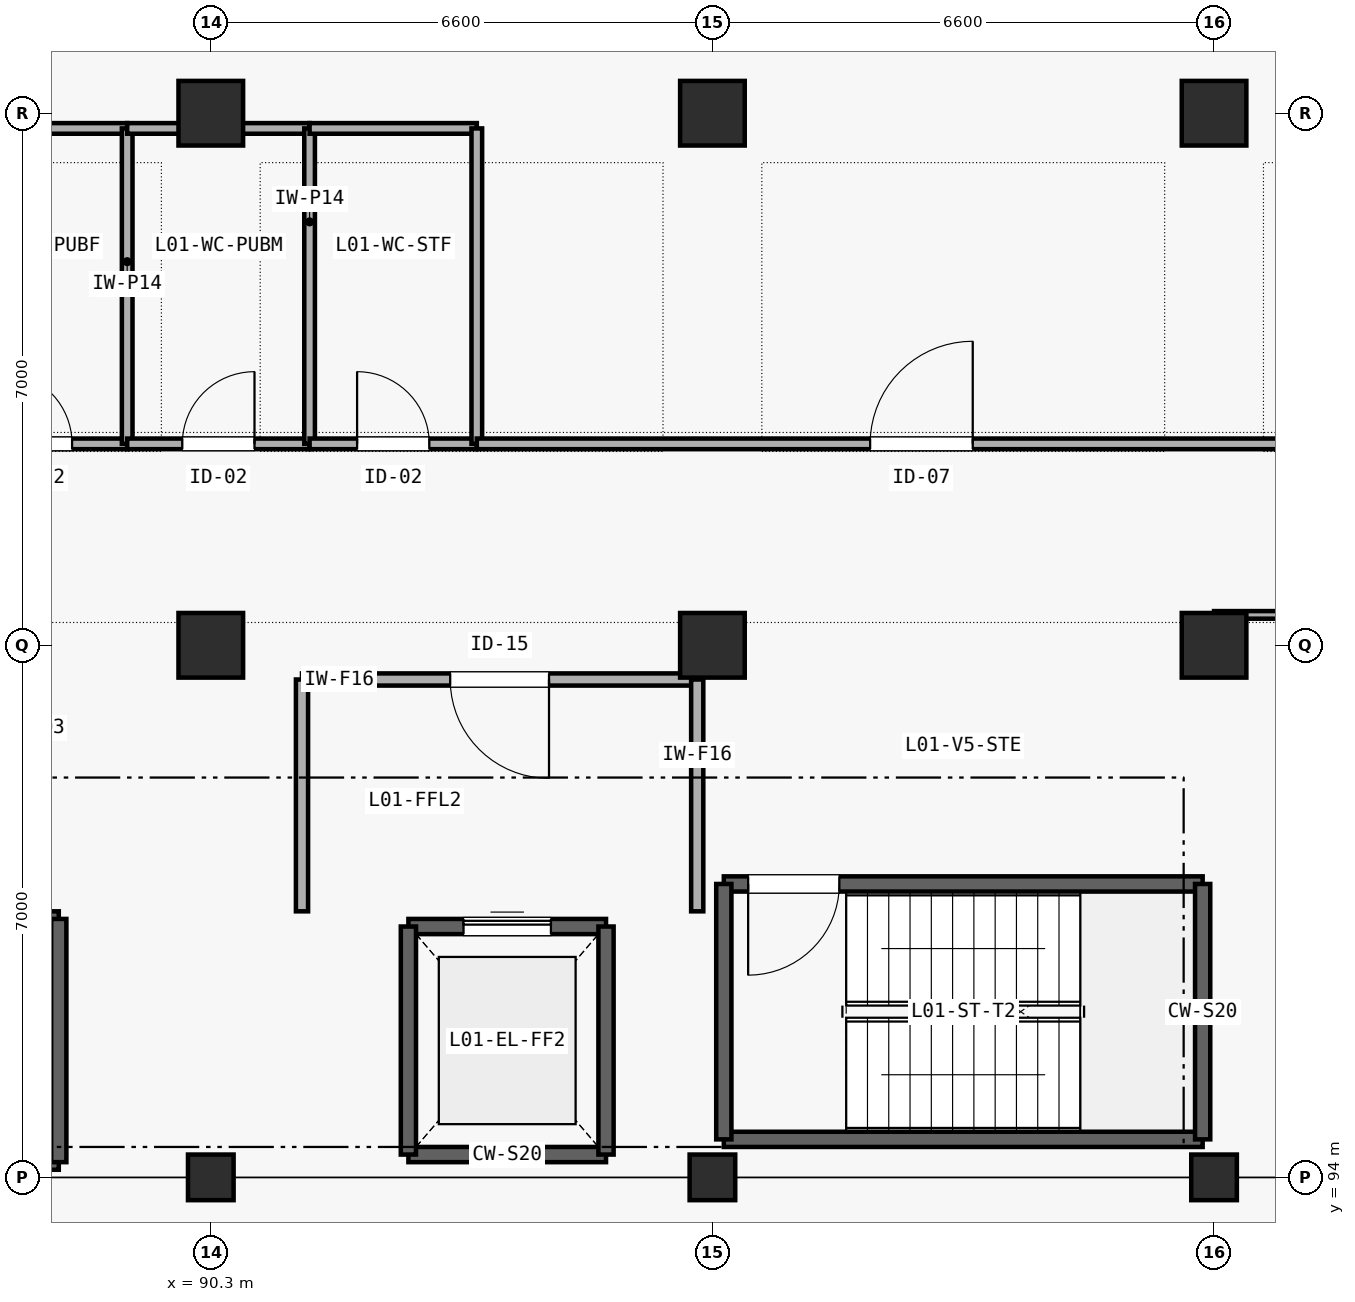
"""IFC4 building model, lengths in metres.
Left out: names, types, materials, properties, quantities, classifications, styles, units other than length and angle.
Written with IfcOpenShell. Run it as: python <this file> out.ifc"""

import sys

from ifc_helpers import new_model, si_unit, direction, frame, frame_2d, origin, origin_2d, place, context, subcontext, project, spatial, rectangle, extrude, element, fill, save


model = new_model("IFC4")
c1 = context("Model", 3, precision=1e-05, world=origin(), true_north=direction((0.0, 1.0)))
c2 = subcontext(c1, "Body", "Model", "MODEL_VIEW")
j1 = project(units=[si_unit("LENGTHUNIT", "METRE"), si_unit("PLANEANGLEUNIT", "RADIAN")], contexts=[c1])
p1 = place(None, origin())
s1 = spatial("IfcSite", under=j1, at=p1, CompositionType="ELEMENT")
p2 = place(p1, origin())
s2 = spatial("IfcBuilding", under=s1, at=p2, CompositionType="ELEMENT")
p3 = place(p2, frame((0.0, 0.0, 4.2)))
s3 = spatial("IfcBuildingStorey", under=s2, at=p3, CompositionType="ELEMENT", Elevation=4.2)
p4 = place(p3, frame((90.3, 94.0, 0.0), z_axis=(0.0, 0.0, 1.0), x_axis=(1.0, 0.0, 0.0)))
e1 = element("IfcColumn", 1, at=p4, inside=s3, PredefinedType="COLUMN", context=c2, shape_type="SweptSolid", body=[
    extrude(rectangle(XDim=0.6, YDim=0.6, at=origin_2d()), origin(), (0.0, 0.0, 1.0), 4.2),
])
for number, where, z_axis, x_axis in (
    (2, (90.3, 101.0, 0.0), (0.0, 0.0, 1.0), (1.0, 0.0, 0.0)),
    (3, (90.3, 108.0, 0.0), (0.0, 0.0, 1.0), (1.0, 0.0, 0.0)),
):
    element("IfcColumn", number, at=place(p3, frame(where, z_axis=z_axis, x_axis=x_axis)), inside=s3, PredefinedType="COLUMN", context=c2, shape_type="SweptSolid", body=[
        extrude(rectangle(XDim=0.85, YDim=0.85, at=origin_2d()), origin(), (0.0, 0.0, 1.0), 4.2),
    ])
p5 = place(p3, frame((96.9, 94.0, 0.0), z_axis=(0.0, 0.0, 1.0), x_axis=(1.0, 0.0, 0.0)))
e4 = element("IfcColumn", 4, at=p5, inside=s3, PredefinedType="COLUMN", context=c2, shape_type="SweptSolid", body=[
    extrude(rectangle(XDim=0.6, YDim=0.6, at=origin_2d()), origin(), (0.0, 0.0, 1.0), 4.2),
])
for number, where, z_axis, x_axis in (
    (5, (96.9, 101.0, 0.0), (0.0, 0.0, 1.0), (1.0, 0.0, 0.0)),
    (6, (96.9, 108.0, 0.0), (0.0, 0.0, 1.0), (1.0, 0.0, 0.0)),
):
    element("IfcColumn", number, at=place(p3, frame(where, z_axis=z_axis, x_axis=x_axis)), inside=s3, PredefinedType="COLUMN", context=c2, shape_type="SweptSolid", body=[
        extrude(rectangle(XDim=0.85, YDim=0.85, at=origin_2d()), origin(), (0.0, 0.0, 1.0), 4.2),
    ])
p6 = place(p3, frame((103.5, 94.0, 0.0), z_axis=(0.0, 0.0, 1.0), x_axis=(1.0, 0.0, 0.0)))
e7 = element("IfcColumn", 7, at=p6, inside=s3, PredefinedType="COLUMN", context=c2, shape_type="SweptSolid", body=[
    extrude(rectangle(XDim=0.6, YDim=0.6, at=origin_2d()), origin(), (0.0, 0.0, 1.0), 4.2),
])
for number, where, z_axis, x_axis in (
    (8, (103.5, 101.0, 0.0), (0.0, 0.0, 1.0), (1.0, 0.0, 0.0)),
    (9, (103.5, 108.0, 0.0), (0.0, 0.0, 1.0), (1.0, 0.0, 0.0)),
):
    element("IfcColumn", number, at=place(p3, frame(where, z_axis=z_axis, x_axis=x_axis)), inside=s3, PredefinedType="COLUMN", context=c2, shape_type="SweptSolid", body=[
        extrude(rectangle(XDim=0.85, YDim=0.85, at=origin_2d()), origin(), (0.0, 0.0, 1.0), 4.2),
    ])
p7 = place(p3, frame((97.05, 94.5, 0.0), z_axis=(0.0, 0.0, 1.0), x_axis=(1.0, 0.0, 0.0)))
e10 = element("IfcWall", 10, at=p7, inside=s3, PredefinedType="SHEAR", context=c2, shape_type="SweptSolid", body=[
    extrude(rectangle(XDim=6.3, YDim=0.2, at=frame_2d((3.15, 0.0))), origin(), (0.0, 0.0, 1.0), 4.2),
])
p8 = place(p3, frame((97.05, 97.86, 0.0), z_axis=(0.0, 0.0, 1.0), x_axis=(1.0, 0.0, 0.0)))
e11 = element("IfcWall", 11, at=p8, inside=s3, PredefinedType="SHEAR", context=c2, shape_type="SweptSolid", body=[
    extrude(rectangle(XDim=6.3, YDim=0.2, at=frame_2d((3.15, 0.0))), origin(), (0.0, 0.0, 1.0), 4.2),
])
p9 = place(p8, frame((0.32, 0.0, 0.0)))
e12 = element("IfcOpeningElement", 12, at=p9, cuts=e11, PredefinedType="OPENING", context=c2, shape_type="SweptSolid", body=[
    extrude(rectangle(XDim=1.2, YDim=2.15, at=frame_2d((0.6, 1.075))), frame((0.0, 0.11, 0.0), z_axis=(0.0, -1.0, 0.0), x_axis=(1.0, 0.0, 0.0)), (0.0, 0.0, 1.0), 0.22),
])
for number, where, z_axis, x_axis in (
    (13, (97.05, 94.5, 0.0), (0.0, 0.0, 1.0), (0.0, 1.0, 0.0)),
    (14, (103.35, 94.5, 0.0), (0.0, 0.0, 1.0), (0.0, 1.0, 0.0)),
):
    element("IfcWall", number, at=place(p3, frame(where, z_axis=z_axis, x_axis=x_axis)), inside=s3, PredefinedType="SHEAR", context=c2, shape_type="SweptSolid", body=[
        extrude(rectangle(XDim=3.36, YDim=0.2, at=frame_2d((1.68, 0.0))), origin(), (0.0, 0.0, 1.0), 4.2),
    ])
p10 = place(p3, frame((92.9, 94.3, 0.0), z_axis=(0.0, 0.0, 1.0), x_axis=(1.0, 0.0, 0.0)))
e15 = element("IfcWall", 15, at=p10, inside=s3, PredefinedType="SHEAR", context=c2, shape_type="SweptSolid", body=[
    extrude(rectangle(XDim=2.6, YDim=0.2, at=frame_2d((1.3, 0.0))), origin(), (0.0, 0.0, 1.0), 4.2),
])
p11 = place(p3, frame((92.9, 97.3, 0.0), z_axis=(0.0, 0.0, 1.0), x_axis=(1.0, 0.0, 0.0)))
e16 = element("IfcWall", 16, at=p11, inside=s3, PredefinedType="SHEAR", context=c2, shape_type="SweptSolid", body=[
    extrude(rectangle(XDim=2.6, YDim=0.2, at=frame_2d((1.3, 0.0))), origin(), (0.0, 0.0, 1.0), 4.2),
])
p12 = place(p11, frame((0.725, 0.0, 0.0)))
e17 = element("IfcOpeningElement", 17, at=p12, cuts=e16, PredefinedType="OPENING", context=c2, shape_type="SweptSolid", body=[
    extrude(rectangle(XDim=1.15, YDim=2.2, at=frame_2d((0.575, 1.1))), frame((0.0, 0.11, 0.0), z_axis=(0.0, -1.0, 0.0), x_axis=(1.0, 0.0, 0.0)), (0.0, 0.0, 1.0), 0.22),
])
for number, where, z_axis, x_axis in (
    (18, (92.9, 94.3, 0.0), (0.0, 0.0, 1.0), (0.0, 1.0, 0.0)),
    (19, (95.5, 94.3, 0.0), (0.0, 0.0, 1.0), (0.0, 1.0, 0.0)),
):
    element("IfcWall", number, at=place(p3, frame(where, z_axis=z_axis, x_axis=x_axis)), inside=s3, PredefinedType="SHEAR", context=c2, shape_type="SweptSolid", body=[
        extrude(rectangle(XDim=3.0, YDim=0.2, at=frame_2d((1.5, 0.0))), origin(), (0.0, 0.0, 1.0), 4.2),
    ])
p13 = place(p3, frame((85.7, 94.2, 0.0), z_axis=(0.0, 0.0, 1.0), x_axis=(1.0, 0.0, 0.0)))
e20 = element("IfcWall", 20, at=p13, inside=s3, PredefinedType="SHEAR", context=c2, shape_type="SweptSolid", body=[
    extrude(rectangle(XDim=2.6, YDim=0.2, at=frame_2d((1.3, 0.0))), origin(), (0.0, 0.0, 1.0), 4.2),
])
p14 = place(p3, frame((85.7, 97.4, 0.0), z_axis=(0.0, 0.0, 1.0), x_axis=(1.0, 0.0, 0.0)))
e21 = element("IfcWall", 21, at=p14, inside=s3, PredefinedType="SHEAR", context=c2, shape_type="SweptSolid", body=[
    extrude(rectangle(XDim=2.6, YDim=0.2, at=frame_2d((1.3, 0.0))), origin(), (0.0, 0.0, 1.0), 4.2),
])
p15 = place(p14, frame((0.7, 0.0, 0.0)))
e22 = element("IfcOpeningElement", 22, at=p15, cuts=e21, PredefinedType="OPENING", context=c2, shape_type="SweptSolid", body=[
    extrude(rectangle(XDim=1.2, YDim=2.2, at=frame_2d((0.6, 1.1))), frame((0.0, 0.11, 0.0), z_axis=(0.0, -1.0, 0.0), x_axis=(1.0, 0.0, 0.0)), (0.0, 0.0, 1.0), 0.22),
])
p16 = place(p3, frame((88.3, 94.2, 0.0), z_axis=(0.0, 0.0, 1.0), x_axis=(0.0, 1.0, 0.0)))
e23 = element("IfcWall", 23, at=p16, inside=s3, PredefinedType="SHEAR", context=c2, shape_type="SweptSolid", body=[
    extrude(rectangle(XDim=3.2, YDim=0.2, at=frame_2d((1.6, 0.0))), origin(), (0.0, 0.0, 1.0), 4.2),
])
p17 = place(p3, frame((91.5, 100.55, 0.0), z_axis=(0.0, 0.0, 1.0), x_axis=(1.0, 0.0, 0.0)))
e24 = element("IfcWall", 24, at=p17, inside=s3, PredefinedType="SOLIDWALL", context=c2, shape_type="SweptSolid", body=[
    extrude(rectangle(XDim=5.2, YDim=0.16, at=frame_2d((2.6, 0.0))), origin(), (0.0, 0.0, 1.0), 3.9),
])
p18 = place(p17, frame((1.95, 0.0, 0.0)))
e25 = element("IfcOpeningElement", 25, at=p18, cuts=e24, PredefinedType="OPENING", context=c2, shape_type="SweptSolid", body=[
    extrude(rectangle(XDim=1.3, YDim=2.15, at=frame_2d((0.65, 1.075))), frame((0.0, 0.09, 0.0), z_axis=(0.0, -1.0, 0.0), x_axis=(1.0, 0.0, 0.0)), (0.0, 0.0, 1.0), 0.18),
])
p19 = place(p3, frame((91.5, 97.5, 0.0), z_axis=(0.0, 0.0, 1.0), x_axis=(0.0, 1.0, 0.0)))
e26 = element("IfcWall", 26, at=p19, inside=s3, PredefinedType="SOLIDWALL", context=c2, shape_type="SweptSolid", body=[
    extrude(rectangle(XDim=3.05, YDim=0.16, at=frame_2d((1.525, 0.0))), origin(), (0.0, 0.0, 1.0), 3.9),
])
p20 = place(p3, frame((96.7, 97.5, 0.0), z_axis=(0.0, 0.0, 1.0), x_axis=(0.0, 1.0, 0.0)))
e27 = element("IfcWall", 27, at=p20, inside=s3, PredefinedType="SOLIDWALL", context=c2, shape_type="SweptSolid", body=[
    extrude(rectangle(XDim=3.05, YDim=0.16, at=frame_2d((1.525, 0.0))), origin(), (0.0, 0.0, 1.0), 3.405),
])
p21 = place(p3, frame((86.8, 103.65, 0.0), z_axis=(0.0, 0.0, 1.0), x_axis=(1.0, 0.0, 0.0)))
e28 = element("IfcWall", 28, at=p21, inside=s3, PredefinedType="PLUMBINGWALL", context=c2, shape_type="SweptSolid", body=[
    extrude(rectangle(XDim=2.4, YDim=0.14, at=frame_2d((1.2, 0.0))), origin(), (0.0, 0.0, 1.0), 3.9),
])
p22 = place(p21, frame((0.725, 0.0, 0.0)))
e29 = element("IfcOpeningElement", 29, at=p22, cuts=e28, PredefinedType="OPENING", context=c2, shape_type="SweptSolid", body=[
    extrude(rectangle(XDim=0.95, YDim=2.1, at=frame_2d((0.475, 1.05))), frame((0.0, 0.08, 0.0), z_axis=(0.0, -1.0, 0.0), x_axis=(1.0, 0.0, 0.0)), (0.0, 0.0, 1.0), 0.16),
])
p23 = place(p3, frame((86.8, 107.8, 0.0), z_axis=(0.0, 0.0, 1.0), x_axis=(1.0, 0.0, 0.0)))
e30 = element("IfcWall", 30, at=p23, inside=s3, PredefinedType="PLUMBINGWALL", context=c2, shape_type="SweptSolid", body=[
    extrude(rectangle(XDim=2.4, YDim=0.14, at=frame_2d((1.2, 0.0))), origin(), (0.0, 0.0, 1.0), 3.285),
])
p24 = place(p3, frame((89.2, 103.65, 0.0), z_axis=(0.0, 0.0, 1.0), x_axis=(0.0, 1.0, 0.0)))
e31 = element("IfcWall", 31, at=p24, inside=s3, PredefinedType="PLUMBINGWALL", context=c2, shape_type="SweptSolid", body=[
    extrude(rectangle(XDim=4.15, YDim=0.14, at=frame_2d((2.075, 0.0))), origin(), (0.0, 0.0, 1.0), 3.9),
])
p25 = place(p3, frame((89.2, 103.65, 0.0), z_axis=(0.0, 0.0, 1.0), x_axis=(1.0, 0.0, 0.0)))
e32 = element("IfcWall", 32, at=p25, inside=s3, PredefinedType="PLUMBINGWALL", context=c2, shape_type="SweptSolid", body=[
    extrude(rectangle(XDim=2.4, YDim=0.14, at=frame_2d((1.2, 0.0))), origin(), (0.0, 0.0, 1.0), 3.9),
])
p26 = place(p25, frame((0.725, 0.0, 0.0)))
e33 = element("IfcOpeningElement", 33, at=p26, cuts=e32, PredefinedType="OPENING", context=c2, shape_type="SweptSolid", body=[
    extrude(rectangle(XDim=0.95, YDim=2.1, at=frame_2d((0.475, 1.05))), frame((0.0, 0.08, 0.0), z_axis=(0.0, -1.0, 0.0), x_axis=(1.0, 0.0, 0.0)), (0.0, 0.0, 1.0), 0.16),
])
p27 = place(p3, frame((89.2, 107.8, 0.0), z_axis=(0.0, 0.0, 1.0), x_axis=(1.0, 0.0, 0.0)))
e34 = element("IfcWall", 34, at=p27, inside=s3, PredefinedType="PLUMBINGWALL", context=c2, shape_type="SweptSolid", body=[
    extrude(rectangle(XDim=2.4, YDim=0.14, at=frame_2d((1.2, 0.0))), origin(), (0.0, 0.0, 1.0), 3.285),
])
p28 = place(p3, frame((91.6, 103.65, 0.0), z_axis=(0.0, 0.0, 1.0), x_axis=(0.0, 1.0, 0.0)))
e35 = element("IfcWall", 35, at=p28, inside=s3, PredefinedType="PLUMBINGWALL", context=c2, shape_type="SweptSolid", body=[
    extrude(rectangle(XDim=4.15, YDim=0.14, at=frame_2d((2.075, 0.0))), origin(), (0.0, 0.0, 1.0), 3.9),
])
p29 = place(p3, frame((91.6, 103.65, 0.0), z_axis=(0.0, 0.0, 1.0), x_axis=(1.0, 0.0, 0.0)))
e36 = element("IfcWall", 36, at=p29, inside=s3, PredefinedType="PLUMBINGWALL", context=c2, shape_type="SweptSolid", body=[
    extrude(rectangle(XDim=2.2, YDim=0.14, at=frame_2d((1.1, 0.0))), origin(), (0.0, 0.0, 1.0), 3.9),
])
p30 = place(p29, frame((0.625, 0.0, 0.0)))
e37 = element("IfcOpeningElement", 37, at=p30, cuts=e36, PredefinedType="OPENING", context=c2, shape_type="SweptSolid", body=[
    extrude(rectangle(XDim=0.95, YDim=2.1, at=frame_2d((0.475, 1.05))), frame((0.0, 0.08, 0.0), z_axis=(0.0, -1.0, 0.0), x_axis=(1.0, 0.0, 0.0)), (0.0, 0.0, 1.0), 0.16),
])
p31 = place(p3, frame((91.6, 107.8, 0.0), z_axis=(0.0, 0.0, 1.0), x_axis=(1.0, 0.0, 0.0)))
e38 = element("IfcWall", 38, at=p31, inside=s3, PredefinedType="PLUMBINGWALL", context=c2, shape_type="SweptSolid", body=[
    extrude(rectangle(XDim=2.2, YDim=0.14, at=frame_2d((1.1, 0.0))), origin(), (0.0, 0.0, 1.0), 3.285),
])
p32 = place(p3, frame((93.8, 103.65, 0.0), z_axis=(0.0, 0.0, 1.0), x_axis=(0.0, 1.0, 0.0)))
e39 = element("IfcWall", 39, at=p32, inside=s3, PredefinedType="PLUMBINGWALL", context=c2, shape_type="SweptSolid", body=[
    extrude(rectangle(XDim=4.15, YDim=0.14, at=frame_2d((2.075, 0.0))), origin(), (0.0, 0.0, 1.0), 3.9),
])
p33 = place(p3, frame((93.8, 103.65, 0.0), z_axis=(0.0, 0.0, 1.0), x_axis=(1.0, 0.0, 0.0)))
e40 = element("IfcWall", 40, at=p33, inside=s3, PredefinedType="PLUMBINGWALL", context=c2, shape_type="SweptSolid", body=[
    extrude(rectangle(XDim=11.7, YDim=0.14, at=frame_2d((5.85, 0.0))), origin(), (0.0, 0.0, 1.0), 3.9),
])
p34 = place(p33, frame((5.175, 0.0, 0.0)))
e41 = element("IfcOpeningElement", 41, at=p34, cuts=e40, PredefinedType="OPENING", context=c2, shape_type="SweptSolid", body=[
    extrude(rectangle(XDim=1.35, YDim=2.2, at=frame_2d((0.675, 1.1))), frame((0.0, 0.08, 0.0), z_axis=(0.0, -1.0, 0.0), x_axis=(1.0, 0.0, 0.0)), (0.0, 0.0, 1.0), 0.16),
])
p35 = place(p3, frame((103.5, 101.4, 0.0), z_axis=(0.0, 0.0, 1.0), x_axis=(1.0, 0.0, 0.0)))
e42 = element("IfcWall", 42, at=p35, inside=s3, PredefinedType="PARTITIONING", context=c2, shape_type="SweptSolid", body=[
    extrude(rectangle(XDim=13.0, YDim=0.1, at=frame_2d((6.5, 0.0))), origin(), (0.0, 0.0, 1.0), 3.9),
])
p36 = place(p35, frame((3.275, 0.0, 0.0)))
e43 = element("IfcOpeningElement", 43, at=p36, cuts=e42, PredefinedType="OPENING", context=c2, shape_type="SweptSolid", body=[
    extrude(rectangle(XDim=1.65, YDim=2.25, at=frame_2d((0.825, 1.125))), frame((0.0, 0.06, 0.0), z_axis=(0.0, -1.0, 0.0), x_axis=(1.0, 0.0, 0.0)), (0.0, 0.0, 1.0), 0.12),
])
p37 = place(p9, frame((1.2, 0.0, 0.0), z_axis=(0.0, 0.0, 1.0), x_axis=(-1.0, 0.0, 0.0)))
e44 = element("IfcDoor", 44, at=p37, inside=s3, OperationType="SINGLE_SWING_RIGHT", PredefinedType="DOOR", context=c2, shape_type="SweptSolid", body=[
    extrude(rectangle(XDim=1.2, YDim=2.15, at=frame_2d((0.6, 1.075))), frame((0.0, 0.025, 0.0), z_axis=(0.0, -1.0, 0.0), x_axis=(1.0, 0.0, 0.0)), (0.0, 0.0, 1.0), 0.05),
])
fill(e12, e44)
p38 = place(p12, origin())
e45 = element("IfcDoor", 45, at=p38, inside=s3, OperationType="SLIDING_TO_LEFT", PredefinedType="DOOR", context=c2, shape_type="SweptSolid", body=[
    extrude(rectangle(XDim=1.15, YDim=2.2, at=frame_2d((0.575, 1.1))), frame((0.0, 0.025, 0.0), z_axis=(0.0, -1.0, 0.0), x_axis=(1.0, 0.0, 0.0)), (0.0, 0.0, 1.0), 0.05),
])
fill(e17, e45)
p39 = place(p18, frame((1.3, 0.0, 0.0), z_axis=(0.0, 0.0, 1.0), x_axis=(-1.0, 0.0, 0.0)))
e46 = element("IfcDoor", 46, at=p39, inside=s3, OperationType="SINGLE_SWING_LEFT", PredefinedType="DOOR", context=c2, shape_type="SweptSolid", body=[
    extrude(rectangle(XDim=1.3, YDim=2.15, at=frame_2d((0.65, 1.075))), frame((0.0, 0.025, 0.0), z_axis=(0.0, -1.0, 0.0), x_axis=(1.0, 0.0, 0.0)), (0.0, 0.0, 1.0), 0.05),
])
fill(e25, e46)
p40 = place(p22, origin())
e47 = element("IfcDoor", 47, at=p40, inside=s3, OperationType="SINGLE_SWING_LEFT", PredefinedType="DOOR", context=c2, shape_type="SweptSolid", body=[
    extrude(rectangle(XDim=0.95, YDim=2.1, at=frame_2d((0.475, 1.05))), frame((0.0, 0.025, 0.0), z_axis=(0.0, -1.0, 0.0), x_axis=(1.0, 0.0, 0.0)), (0.0, 0.0, 1.0), 0.05),
])
fill(e29, e47)
p41 = place(p26, origin())
e48 = element("IfcDoor", 48, at=p41, inside=s3, OperationType="SINGLE_SWING_RIGHT", PredefinedType="DOOR", context=c2, shape_type="SweptSolid", body=[
    extrude(rectangle(XDim=0.95, YDim=2.1, at=frame_2d((0.475, 1.05))), frame((0.0, 0.025, 0.0), z_axis=(0.0, -1.0, 0.0), x_axis=(1.0, 0.0, 0.0)), (0.0, 0.0, 1.0), 0.05),
])
fill(e33, e48)
p42 = place(p30, origin())
e49 = element("IfcDoor", 49, at=p42, inside=s3, OperationType="SINGLE_SWING_LEFT", PredefinedType="DOOR", context=c2, shape_type="SweptSolid", body=[
    extrude(rectangle(XDim=0.95, YDim=2.1, at=frame_2d((0.475, 1.05))), frame((0.0, 0.025, 0.0), z_axis=(0.0, -1.0, 0.0), x_axis=(1.0, 0.0, 0.0)), (0.0, 0.0, 1.0), 0.05),
])
fill(e37, e49)
p43 = place(p34, origin())
e50 = element("IfcDoor", 50, at=p43, inside=s3, OperationType="SINGLE_SWING_RIGHT", PredefinedType="DOOR", context=c2, shape_type="SweptSolid", body=[
    extrude(rectangle(XDim=1.35, YDim=2.2, at=frame_2d((0.675, 1.1))), frame((0.0, 0.025, 0.0), z_axis=(0.0, -1.0, 0.0), x_axis=(1.0, 0.0, 0.0)), (0.0, 0.0, 1.0), 0.05),
])
fill(e41, e50)
save(model, sys.argv[1])
